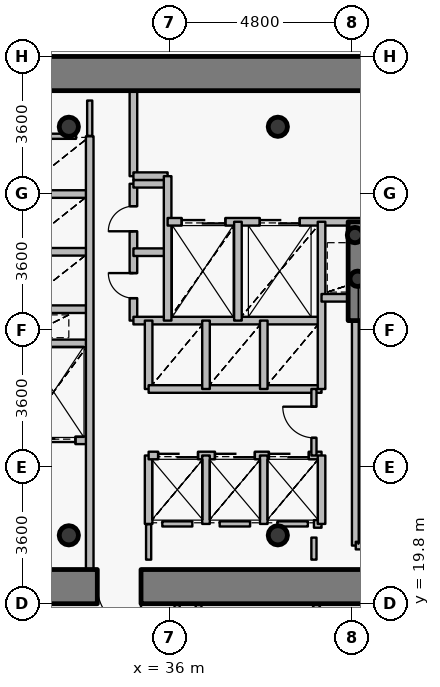
"""IFC4 building model, lengths in metres.
Left out: names, types, materials, properties, quantities, classifications, styles, units other than length and angle.
Written with IfcOpenShell. Run it as: python <this file> out.ifc"""

import sys

from ifc_helpers import new_model, si_unit, direction, frame, frame_2d, origin, origin_2d, place, context, subcontext, project, spatial, rectangle, hollow_circle, extrude, source, transform, mapped, element, fill, save


model = new_model("IFC4")
c1 = context("Model", 3, precision=1e-05, world=origin(), true_north=direction((0.0, 1.0)))
c2 = subcontext(c1, "Body", "Model", "MODEL_VIEW")
j1 = project(units=[si_unit("LENGTHUNIT", "METRE"), si_unit("PLANEANGLEUNIT", "RADIAN")], contexts=[c1])
p1 = place(None, origin())
s1 = spatial("IfcSite", under=j1, at=p1, CompositionType="ELEMENT")
p2 = place(p1, origin())
s2 = spatial("IfcBuilding", under=s1, at=p2, CompositionType="ELEMENT")
p3 = place(p2, frame((0.0, 0.0, 53.4)))
s3 = spatial("IfcBuildingStorey", under=s2, at=p3, CompositionType="ELEMENT", Elevation=53.4)
for number, where, z_axis, x_axis in (
    (1, (33.35, 21.6, 0.0), (0.0, 0.0, 1.0), (1.0, 0.0, 0.0)),
    (2, (38.85, 21.6, 0.0), (0.0, 0.0, 1.0), (1.0, 0.0, 0.0)),
    (3, (38.85, 32.35, 0.0), (0.0, 0.0, 1.0), (1.0, 0.0, 0.0)),
    (4, (33.35, 32.35, 0.0), (0.0, 0.0, 1.0), (1.0, 0.0, 0.0)),
):
    element("IfcColumn", number, at=place(p3, frame(where, z_axis=z_axis, x_axis=x_axis)), inside=s3, PredefinedType="COLUMN", context=c2, shape_type="SweptSolid", body=[
        extrude(hollow_circle(Radius=0.254, WallThickness=0.02, at=origin_2d()), origin(), (0.0, 0.0, 1.0), 4.2),
    ])
for number, where, z_axis, x_axis in (
    (5, (40.95, 28.35, 0.0), (0.0, 0.0, 1.0), (1.0, 0.0, 0.0)),
    (6, (40.88, 29.5, 0.0), (0.0, 0.0, 1.0), (1.0, 0.0, 0.0)),
):
    element("IfcColumn", number, at=place(p3, frame(where, z_axis=z_axis, x_axis=x_axis)), inside=s3, PredefinedType="COLUMN", context=c2, shape_type="SweptSolid", body=[
        extrude(hollow_circle(Radius=0.203, WallThickness=0.016, at=origin_2d()), origin(), (0.0, 0.0, 1.0), 4.2),
    ])
p4 = place(p3, frame((26.75, 33.75, 0.0), z_axis=(0.0, 0.0, 1.0), x_axis=(1.0, 0.0, 0.0)))
e7 = element("IfcWall", 7, at=p4, inside=s3, PredefinedType="SHEAR", context=c2, shape_type="SweptSolid", body=[
    extrude(rectangle(XDim=18.5, YDim=0.9, at=frame_2d((9.25, 0.0))), origin(), (0.0, 0.0, 1.0), 3.4),
])
p5 = place(p3, frame((45.25, 20.25, 0.0), z_axis=(0.0, 0.0, 1.0), x_axis=(-1.0, 0.0, 0.0)))
e8 = element("IfcWall", 8, at=p5, inside=s3, PredefinedType="SHEAR", context=c2, shape_type="SweptSolid", body=[
    extrude(rectangle(XDim=18.5, YDim=0.9, at=frame_2d((9.25, 0.0))), origin(), (0.0, 0.0, 1.0), 3.4),
])
p6 = place(p5, frame((10.0, 0.0, 0.0)))
e9 = element("IfcOpeningElement", 9, at=p6, cuts=e8, PredefinedType="OPENING", context=c2, shape_type="SweptSolid", body=[
    extrude(rectangle(XDim=1.15, YDim=2.15, at=origin_2d()), frame((0.575, 0.46, 1.075), z_axis=(0.0, -1.0, 0.0), x_axis=(1.0, 0.0, 0.0)), (0.0, 0.0, 1.0), 0.92),
])
p7 = place(p3, frame((40.9, 27.25, 0.0), z_axis=(0.0, 0.0, 1.0), x_axis=(0.0, 1.0, 0.0)))
e10 = element("IfcWall", 10, at=p7, inside=s3, PredefinedType="SHEAR", context=c2, shape_type="SweptSolid", body=[
    extrude(rectangle(XDim=2.6, YDim=0.4, at=frame_2d((1.3, 0.0))), origin(), (0.0, 0.0, 1.0), 3.55),
])
p8 = place(p3, frame((32.0, 24.1, 0.0), z_axis=(0.0, 0.0, 1.0), x_axis=(1.0, 0.0, 0.0)))
e11 = element("IfcWall", 11, at=p8, inside=s3, PredefinedType="PARTITIONING", context=c2, shape_type="SweptSolid", body=[
    extrude(rectangle(XDim=1.9, YDim=0.2, at=frame_2d((0.95, 0.0))), origin(), (0.0, 0.0, 1.0), 3.535),
])
p9 = place(p8, frame((0.375, 0.0, 0.0)))
e12 = element("IfcOpeningElement", 12, at=p9, cuts=e11, PredefinedType="OPENING", context=c2, shape_type="SweptSolid", body=[
    extrude(rectangle(XDim=1.15, YDim=2.15, at=origin_2d()), frame((0.575, 0.11, 1.075), z_axis=(0.0, -1.0, 0.0), x_axis=(1.0, 0.0, 0.0)), (0.0, 0.0, 1.0), 0.22),
])
for number, where, z_axis, x_axis in (
    (13, (32.0, 26.65, 0.0), (0.0, 0.0, 1.0), (1.0, 0.0, 0.0)),
    (14, (32.0, 27.55, 0.0), (0.0, 0.0, 1.0), (1.0, 0.0, 0.0)),
    (15, (32.0, 29.06, 0.0), (0.0, 0.0, 1.0), (1.0, 0.0, 0.0)),
    (16, (32.0, 30.58, 0.0), (0.0, 0.0, 1.0), (1.0, 0.0, 0.0)),
):
    element("IfcWall", number, at=place(p3, frame(where, z_axis=z_axis, x_axis=x_axis)), inside=s3, PredefinedType="PARTITIONING", context=c2, shape_type="SweptSolid", body=[
        extrude(rectangle(XDim=1.9, YDim=0.2, at=frame_2d((0.95, 0.0))), origin(), (0.0, 0.0, 1.0), 3.535),
    ])
p10 = place(p3, frame((33.9, 20.7, 0.0), z_axis=(0.0, 0.0, 1.0), x_axis=(0.0, 1.0, 0.0)))
e17 = element("IfcWall", 17, at=p10, inside=s3, PredefinedType="PARTITIONING", context=c2, shape_type="SweptSolid", body=[
    extrude(rectangle(XDim=11.4, YDim=0.2, at=frame_2d((5.7, 0.0))), origin(), (0.0, 0.0, 1.0), 3.535),
])
p11 = place(p3, frame((35.05, 27.25, 0.0), z_axis=(0.0, 0.0, 1.0), x_axis=(0.0, 1.0, 0.0)))
e18 = element("IfcWall", 18, at=p11, inside=s3, PredefinedType="PARTITIONING", context=c2, shape_type="SweptSolid", body=[
    extrude(rectangle(XDim=3.6, YDim=0.2, at=frame_2d((1.8, 0.0))), origin(), (0.0, 0.0, 1.0), 3.95),
])
p12 = place(p11, frame((0.59, 0.0, 0.0)))
e19 = element("IfcOpeningElement", 19, at=p12, cuts=e18, PredefinedType="OPENING", context=c2, shape_type="SweptSolid", body=[
    extrude(rectangle(XDim=0.66, YDim=2.05, at=origin_2d()), frame((0.33, 0.11, 1.025), z_axis=(0.0, -1.0, 0.0), x_axis=(1.0, 0.0, 0.0)), (0.0, 0.0, 1.0), 0.22),
])
p13 = place(p11, frame((2.35, 0.0, 0.0)))
e20 = element("IfcOpeningElement", 20, at=p13, cuts=e18, PredefinedType="OPENING", context=c2, shape_type="SweptSolid", body=[
    extrude(rectangle(XDim=0.66, YDim=2.05, at=origin_2d()), frame((0.33, 0.11, 1.025), z_axis=(0.0, -1.0, 0.0), x_axis=(1.0, 0.0, 0.0)), (0.0, 0.0, 1.0), 0.22),
])
p14 = place(p3, frame((35.05, 27.25, 0.0), z_axis=(0.0, 0.0, 1.0), x_axis=(1.0, 0.0, 0.0)))
e21 = element("IfcWall", 21, at=p14, inside=s3, PredefinedType="PARTITIONING", context=c2, shape_type="SweptSolid", body=[
    extrude(rectangle(XDim=4.95, YDim=0.2, at=frame_2d((2.475, 0.0))), origin(), (0.0, 0.0, 1.0), 3.535),
])
for number, where, z_axis, x_axis in (
    (22, (35.05, 29.05, 0.0), (0.0, 0.0, 1.0), (1.0, 0.0, 0.0)),
    (23, (35.05, 30.85, 0.0), (0.0, 0.0, 1.0), (1.0, 0.0, 0.0)),
):
    element("IfcWall", number, at=place(p3, frame(where, z_axis=z_axis, x_axis=x_axis)), inside=s3, PredefinedType="PARTITIONING", context=c2, shape_type="SweptSolid", body=[
        extrude(rectangle(XDim=0.9, YDim=0.2, at=frame_2d((0.45, 0.0))), origin(), (0.0, 0.0, 1.0), 3.95),
    ])
p15 = place(p3, frame((35.05, 31.05, 0.0), z_axis=(0.0, 0.0, 1.0), x_axis=(0.0, 1.0, 0.0)))
e24 = element("IfcWall", 24, at=p15, inside=s3, PredefinedType="PARTITIONING", context=c2, shape_type="SweptSolid", body=[
    extrude(rectangle(XDim=2.25, YDim=0.2, at=frame_2d((1.125, 0.0))), origin(), (0.0, 0.0, 1.0), 3.535),
])
p16 = place(p3, frame((35.05, 31.05, 0.0), z_axis=(0.0, 0.0, 1.0), x_axis=(1.0, 0.0, 0.0)))
e25 = element("IfcWall", 25, at=p16, inside=s3, PredefinedType="PARTITIONING", context=c2, shape_type="SweptSolid", body=[
    extrude(rectangle(XDim=0.9, YDim=0.2, at=frame_2d((0.45, 0.0))), origin(), (0.0, 0.0, 1.0), 3.95),
])
p17 = place(p3, frame((35.45, 21.9, 0.0), z_axis=(0.0, 0.0, 1.0), x_axis=(0.0, 1.0, 0.0)))
e26 = element("IfcWall", 26, at=p17, inside=s3, PredefinedType="PARTITIONING", context=c2, shape_type="SweptSolid", body=[
    extrude(rectangle(XDim=1.8, YDim=0.2, at=frame_2d((0.9, 0.0))), origin(), (0.0, 0.0, 1.0), 3.95),
])
p18 = place(p3, frame((35.45, 23.7, 0.0), z_axis=(0.0, 0.0, 1.0), x_axis=(1.0, 0.0, 0.0)))
e27 = element("IfcWall", 27, at=p18, inside=s3, PredefinedType="PARTITIONING", context=c2, shape_type="SweptSolid", body=[
    extrude(rectangle(XDim=4.55, YDim=0.2, at=frame_2d((2.275, 0.0))), origin(), (0.0, 0.0, 1.0), 3.535),
])
p19 = place(p18, frame((0.25, 0.0, 0.0)))
e28 = element("IfcOpeningElement", 28, at=p19, cuts=e27, PredefinedType="OPENING", context=c2, shape_type="SweptSolid", body=[
    extrude(rectangle(XDim=1.05, YDim=2.15, at=origin_2d()), frame((0.525, 0.11, 1.075), z_axis=(0.0, -1.0, 0.0), x_axis=(1.0, 0.0, 0.0)), (0.0, 0.0, 1.0), 0.22),
])
p20 = place(p18, frame((1.745, 0.0, 0.0)))
e29 = element("IfcOpeningElement", 29, at=p20, cuts=e27, PredefinedType="OPENING", context=c2, shape_type="SweptSolid", body=[
    extrude(rectangle(XDim=1.05, YDim=2.15, at=origin_2d()), frame((0.525, 0.11, 1.075), z_axis=(0.0, -1.0, 0.0), x_axis=(1.0, 0.0, 0.0)), (0.0, 0.0, 1.0), 0.22),
])
p21 = place(p18, frame((3.165, 0.0, 0.0)))
e30 = element("IfcOpeningElement", 30, at=p21, cuts=e27, PredefinedType="OPENING", context=c2, shape_type="SweptSolid", body=[
    extrude(rectangle(XDim=1.05, YDim=2.15, at=origin_2d()), frame((0.525, 0.11, 1.075), z_axis=(0.0, -1.0, 0.0), x_axis=(1.0, 0.0, 0.0)), (0.0, 0.0, 1.0), 0.22),
])
p22 = place(p3, frame((35.45, 25.45, 0.0), z_axis=(0.0, 0.0, 1.0), x_axis=(0.0, 1.0, 0.0)))
e31 = element("IfcWall", 31, at=p22, inside=s3, PredefinedType="PARTITIONING", context=c2, shape_type="SweptSolid", body=[
    extrude(rectangle(XDim=1.8, YDim=0.2, at=frame_2d((0.9, 0.0))), origin(), (0.0, 0.0, 1.0), 3.95),
])
p23 = place(p3, frame((35.45, 25.45, 0.0), z_axis=(0.0, 0.0, 1.0), x_axis=(1.0, 0.0, 0.0)))
e32 = element("IfcWall", 32, at=p23, inside=s3, PredefinedType="PARTITIONING", context=c2, shape_type="SweptSolid", body=[
    extrude(rectangle(XDim=4.55, YDim=0.2, at=frame_2d((2.275, 0.0))), origin(), (0.0, 0.0, 1.0), 3.535),
])
p24 = place(p3, frame((35.95, 27.25, 0.0), z_axis=(0.0, 0.0, 1.0), x_axis=(0.0, 1.0, 0.0)))
e33 = element("IfcWall", 33, at=p24, inside=s3, PredefinedType="PARTITIONING", context=c2, shape_type="SweptSolid", body=[
    extrude(rectangle(XDim=3.8, YDim=0.2, at=frame_2d((1.9, 0.0))), origin(), (0.0, 0.0, 1.0), 3.95),
])
p25 = place(p3, frame((35.95, 29.85, 0.0), z_axis=(0.0, 0.0, 1.0), x_axis=(1.0, 0.0, 0.0)))
e34 = element("IfcWall", 34, at=p25, inside=s3, PredefinedType="PARTITIONING", context=c2, shape_type="SweptSolid", body=[
    extrude(rectangle(XDim=8.49, YDim=0.2, at=frame_2d((4.245, 0.0))), origin(), (0.0, 0.0, 1.0), 3.535),
])
p26 = place(p25, frame((6.1, 0.0, 0.0)))
e35 = element("IfcOpeningElement", 35, at=p26, cuts=e34, PredefinedType="OPENING", context=c2, shape_type="SweptSolid", body=[
    extrude(rectangle(XDim=1.2, YDim=2.15, at=origin_2d()), frame((0.6, 0.11, 1.075), z_axis=(0.0, -1.0, 0.0), x_axis=(1.0, 0.0, 0.0)), (0.0, 0.0, 1.0), 0.22),
])
p27 = place(p25, frame((0.37, 0.0, 0.0)))
e36 = element("IfcOpeningElement", 36, at=p27, cuts=e34, PredefinedType="OPENING", context=c2, shape_type="SweptSolid", body=[
    extrude(rectangle(XDim=1.15, YDim=2.15, at=origin_2d()), frame((0.575, 0.11, 1.075), z_axis=(0.0, -1.0, 0.0), x_axis=(1.0, 0.0, 0.0)), (0.0, 0.0, 1.0), 0.22),
])
p28 = place(p25, frame((2.425, 0.0, 0.0)))
e37 = element("IfcOpeningElement", 37, at=p28, cuts=e34, PredefinedType="OPENING", context=c2, shape_type="SweptSolid", body=[
    extrude(rectangle(XDim=1.05, YDim=2.15, at=origin_2d()), frame((0.525, 0.11, 1.075), z_axis=(0.0, -1.0, 0.0), x_axis=(1.0, 0.0, 0.0)), (0.0, 0.0, 1.0), 0.22),
])
p29 = place(p3, frame((36.2, 17.9, 0.0), z_axis=(0.0, 0.0, 1.0), x_axis=(0.0, 1.0, 0.0)))
e38 = element("IfcWall", 38, at=p29, inside=s3, PredefinedType="PARTITIONING", context=c2, shape_type="SweptSolid", body=[
    extrude(rectangle(XDim=1.9, YDim=0.135, at=frame_2d((0.95, 0.0))), origin(), (0.0, 0.0, 1.0), 3.285),
])
p30 = place(p3, frame((36.757, 19.8, 0.0), z_axis=(0.0, 0.0, 1.0), x_axis=(0.10451927992, -0.994522860534, 0.0)))
e39 = element("IfcWall", 39, at=p30, inside=s3, PredefinedType="PARTITIONING", context=c2, shape_type="SweptSolid", body=[
    extrude(rectangle(XDim=17.047, YDim=0.15, at=frame_2d((8.523, 0.0))), origin(), (0.0, 0.0, 1.0), 3.335),
])
p31 = place(p30, frame((7.999, 0.0, 0.0)))
e40 = element("IfcOpeningElement", 40, at=p31, cuts=e39, PredefinedType="OPENING", context=c2, shape_type="SweptSolid", body=[
    extrude(rectangle(XDim=1.05, YDim=2.15, at=origin_2d()), frame((0.525, 0.085, 1.075), z_axis=(0.0, -1.0, 0.0), x_axis=(1.0, 0.0, 0.0)), (0.0, 0.0, 1.0), 0.17),
])
for number, where, z_axis, x_axis in (
    (41, (36.96, 21.9, 0.0), (0.0, 0.0, 1.0), (0.0, 1.0, 0.0)),
    (42, (36.96, 25.45, 0.0), (0.0, 0.0, 1.0), (0.0, 1.0, 0.0)),
):
    element("IfcWall", number, at=place(p3, frame(where, z_axis=z_axis, x_axis=x_axis)), inside=s3, PredefinedType="PARTITIONING", context=c2, shape_type="SweptSolid", body=[
        extrude(rectangle(XDim=1.8, YDim=0.2, at=frame_2d((0.9, 0.0))), origin(), (0.0, 0.0, 1.0), 3.95),
    ])
p32 = place(p3, frame((37.8, 27.25, 0.0), z_axis=(0.0, 0.0, 1.0), x_axis=(0.0, 1.0, 0.0)))
e43 = element("IfcWall", 43, at=p32, inside=s3, PredefinedType="PARTITIONING", context=c2, shape_type="SweptSolid", body=[
    extrude(rectangle(XDim=2.6, YDim=0.2, at=frame_2d((1.3, 0.0))), origin(), (0.0, 0.0, 1.0), 3.95),
])
for number, where, z_axis, x_axis in (
    (44, (38.48, 21.9, 0.0), (0.0, 0.0, 1.0), (0.0, 1.0, 0.0)),
    (45, (38.48, 25.45, 0.0), (0.0, 0.0, 1.0), (0.0, 1.0, 0.0)),
):
    element("IfcWall", number, at=place(p3, frame(where, z_axis=z_axis, x_axis=x_axis)), inside=s3, PredefinedType="PARTITIONING", context=c2, shape_type="SweptSolid", body=[
        extrude(rectangle(XDim=1.8, YDim=0.2, at=frame_2d((0.9, 0.0))), origin(), (0.0, 0.0, 1.0), 3.95),
    ])
p33 = place(p3, frame((39.8, 21.9, 0.0), z_axis=(0.0, 0.0, 1.0), x_axis=(1.0, 0.0, 0.0)))
e46 = element("IfcWall", 46, at=p33, inside=s3, PredefinedType="PARTITIONING", context=c2, shape_type="SweptSolid", body=[
    extrude(rectangle(XDim=0.2, YDim=0.2, at=frame_2d((0.1, 0.0))), origin(), (0.0, 0.0, 1.0), 3.95),
])
p34 = place(p3, frame((39.8, 23.7, 0.0), z_axis=(0.0, 0.0, 1.0), x_axis=(0.0, 1.0, 0.0)))
e47 = element("IfcWall", 47, at=p34, inside=s3, PredefinedType="PARTITIONING", context=c2, shape_type="SweptSolid", body=[
    extrude(rectangle(XDim=1.75, YDim=0.135, at=frame_2d((0.875, 0.0))), origin(), (0.0, 0.0, 1.0), 3.95),
])
p35 = place(p34, frame((0.465, 0.0, 0.0)))
e48 = element("IfcOpeningElement", 48, at=p35, cuts=e47, PredefinedType="OPENING", context=c2, shape_type="SweptSolid", body=[
    extrude(rectangle(XDim=0.82, YDim=2.1, at=origin_2d()), frame((0.41, 0.078, 1.05), z_axis=(0.0, -1.0, 0.0), x_axis=(1.0, 0.0, 0.0)), (0.0, 0.0, 1.0), 0.155),
])
p36 = place(p3, frame((39.828, 19.8, 0.0), z_axis=(0.0, 0.0, 1.0), x_axis=(0.469475400737, -0.882945552174, 0.0)))
e49 = element("IfcWall", 49, at=p36, inside=s3, PredefinedType="PARTITIONING", context=c2, shape_type="SweptSolid", body=[
    extrude(rectangle(XDim=17.188, YDim=0.15, at=frame_2d((8.594, 0.0))), origin(), (0.0, 0.0, 1.0), 3.335),
])
p37 = place(p36, frame((8.069, 0.0, 0.0)))
e50 = element("IfcOpeningElement", 50, at=p37, cuts=e49, PredefinedType="OPENING", context=c2, shape_type="SweptSolid", body=[
    extrude(rectangle(XDim=1.05, YDim=2.15, at=origin_2d()), frame((0.525, 0.085, 1.075), z_axis=(0.0, -1.0, 0.0), x_axis=(1.0, 0.0, 0.0)), (0.0, 0.0, 1.0), 0.17),
])
p38 = place(p3, frame((40.0, 21.9, 0.0), z_axis=(0.0, 0.0, 1.0), x_axis=(0.0, 1.0, 0.0)))
e51 = element("IfcWall", 51, at=p38, inside=s3, PredefinedType="PARTITIONING", context=c2, shape_type="SweptSolid", body=[
    extrude(rectangle(XDim=1.8, YDim=0.2, at=frame_2d((0.9, 0.0))), origin(), (0.0, 0.0, 1.0), 3.95),
])
p39 = place(p3, frame((40.0, 25.45, 0.0), z_axis=(0.0, 0.0, 1.0), x_axis=(0.0, 1.0, 0.0)))
e52 = element("IfcWall", 52, at=p39, inside=s3, PredefinedType="PARTITIONING", context=c2, shape_type="SweptSolid", body=[
    extrude(rectangle(XDim=4.4, YDim=0.2, at=frame_2d((2.2, 0.0))), origin(), (0.0, 0.0, 1.0), 3.95),
])
p40 = place(p3, frame((40.0, 27.85, 0.0), z_axis=(0.0, 0.0, 1.0), x_axis=(1.0, 0.0, 0.0)))
e53 = element("IfcWall", 53, at=p40, inside=s3, PredefinedType="PARTITIONING", context=c2, shape_type="SweptSolid", body=[
    extrude(rectangle(XDim=0.9, YDim=0.2, at=frame_2d((0.45, 0.0))), origin(), (0.0, 0.0, 1.0), 3.95),
])
p41 = place(p3, frame((40.9, 21.33, 0.0), z_axis=(0.0, 0.0, 1.0), x_axis=(0.0, 1.0, 0.0)))
e54 = element("IfcWall", 54, at=p41, inside=s3, PredefinedType="PARTITIONING", context=c2, shape_type="SweptSolid", body=[
    extrude(rectangle(XDim=5.91, YDim=0.2, at=frame_2d((2.955, 0.0))), origin(), (0.0, 0.0, 1.0), 3.485),
])
p42 = place(p3, frame((40.9, 21.33, 0.0), z_axis=(0.0, 0.0, 1.0), x_axis=(1.0, 0.0, 0.0)))
e55 = element("IfcWall", 55, at=p42, inside=s3, PredefinedType="PARTITIONING", context=c2, shape_type="SweptSolid", body=[
    extrude(rectangle(XDim=0.25, YDim=0.2, at=frame_2d((0.125, 0.0))), origin(), (0.0, 0.0, 1.0), 3.485),
])
p43 = place(p3, frame((36.6, 21.9, 0.0), z_axis=(0.0, 0.0, 1.0), x_axis=(-1.0, 0.0, 0.0)))
e56 = element("IfcWall", 56, at=p43, inside=s3, PredefinedType="PARTITIONING", context=c2, shape_type="SweptSolid", body=[
    extrude(rectangle(XDim=0.79, YDim=0.135, at=frame_2d((0.395, 0.0))), origin(), (0.0, 0.0, 1.0), 3.95),
])
p44 = place(p3, frame((38.12, 21.9, 0.0), z_axis=(0.0, 0.0, 1.0), x_axis=(-1.0, 0.0, 0.0)))
e57 = element("IfcWall", 57, at=p44, inside=s3, PredefinedType="PARTITIONING", context=c2, shape_type="SweptSolid", body=[
    extrude(rectangle(XDim=0.8, YDim=0.135, at=frame_2d((0.4, 0.0))), origin(), (0.0, 0.0, 1.0), 3.95),
])
p45 = place(p3, frame((39.64, 21.9, 0.0), z_axis=(0.0, 0.0, 1.0), x_axis=(-1.0, 0.0, 0.0)))
e58 = element("IfcWall", 58, at=p45, inside=s3, PredefinedType="PARTITIONING", context=c2, shape_type="SweptSolid", body=[
    extrude(rectangle(XDim=0.8, YDim=0.135, at=frame_2d((0.4, 0.0))), origin(), (0.0, 0.0, 1.0), 3.535),
])
p46 = place(p3, frame((32.36, 32.1, 0.0), z_axis=(0.0, 0.0, 1.0), x_axis=(1.0, 0.0, 0.0)))
e59 = element("IfcWall", 59, at=p46, inside=s3, PredefinedType="PARTITIONING", context=c2, shape_type="SweptSolid", body=[
    extrude(rectangle(XDim=1.18, YDim=0.135, at=frame_2d((0.59, 0.0))), origin(), (0.0, 0.0, 1.0), 3.535),
])
p47 = place(p3, frame((39.8, 20.96, 0.0), z_axis=(0.0, 0.0, 1.0), x_axis=(0.0, 1.0, 0.0)))
e60 = element("IfcWall", 60, at=p47, inside=s3, PredefinedType="PARTITIONING", context=c2, shape_type="SweptSolid", body=[
    extrude(rectangle(XDim=0.58, YDim=0.135, at=frame_2d((0.29, 0.0))), origin(), (0.0, 0.0, 1.0), 3.485),
])
for number, where, z_axis, x_axis in (
    (61, (35.45, 21.89, 0.0), (0.0, 0.0, 1.0), (0.0, -1.0, 0.0)),
    (62, (33.9, 32.11, 0.0), (0.0, 0.0, 1.0), (0.0, 1.0, 0.0)),
):
    element("IfcWall", number, at=place(p3, frame(where, z_axis=z_axis, x_axis=x_axis)), inside=s3, PredefinedType="PARTITIONING", context=c2, shape_type="SweptSolid", body=[
        extrude(rectangle(XDim=0.93, YDim=0.135, at=frame_2d((0.465, 0.0))), origin(), (0.0, 0.0, 1.0), 3.535),
    ])
m1 = source(origin(), c2, "Body", "SweptSolid", [
    extrude(rectangle(XDim=1.15, YDim=2.15, at=origin_2d()), frame((0.575, 0.025, 1.075), z_axis=(0.0, -1.0, 0.0), x_axis=(1.0, 0.0, 0.0)), (0.0, 0.0, 1.0), 0.05),
])
p48 = place(p6, origin())
e63 = element("IfcDoor", 63, at=p48, inside=s3, OperationType="SINGLE_SWING_LEFT", PredefinedType="DOOR", context=c2, shape_type="MappedRepresentation", body=[
    mapped(m1, transform((0.0, 0.0, 0.0), x_axis=(1.0, 0.0, 0.0), y_axis=(0.0, 1.0, 0.0), z_axis=(0.0, 0.0, 1.0), scale=1.0)),
])
fill(e9, e63)
m2 = source(origin(), c2, "Body", "SweptSolid", [
    extrude(rectangle(XDim=1.15, YDim=2.15, at=origin_2d()), frame((0.575, 0.025, 1.075), z_axis=(0.0, -1.0, 0.0), x_axis=(1.0, 0.0, 0.0)), (0.0, 0.0, 1.0), 0.05),
])
p49 = place(p27, origin())
e64 = element("IfcDoor", 64, at=p49, inside=s3, OperationType="DOUBLE_DOOR_SLIDING", PredefinedType="USERDEFINED", context=c2, shape_type="MappedRepresentation", body=[
    mapped(m2, transform((0.0, 0.0, 0.0), x_axis=(1.0, 0.0, 0.0), y_axis=(0.0, 1.0, 0.0), z_axis=(0.0, 0.0, 1.0), scale=1.0)),
])
fill(e36, e64)
p50 = place(p9, origin())
e65 = element("IfcDoor", 65, at=p50, inside=s3, OperationType="DOUBLE_DOOR_SLIDING", PredefinedType="USERDEFINED", context=c2, shape_type="MappedRepresentation", body=[
    mapped(m2, transform((0.0, 0.0, 0.0), x_axis=(1.0, 0.0, 0.0), y_axis=(0.0, 1.0, 0.0), z_axis=(0.0, 0.0, 1.0), scale=1.0)),
])
fill(e12, e65)
m3 = source(origin(), c2, "Body", "SweptSolid", [
    extrude(rectangle(XDim=1.05, YDim=2.15, at=origin_2d()), frame((0.525, 0.025, 1.075), z_axis=(0.0, -1.0, 0.0), x_axis=(1.0, 0.0, 0.0)), (0.0, 0.0, 1.0), 0.05),
])
p51 = place(p28, origin())
e66 = element("IfcDoor", 66, at=p51, inside=s3, OperationType="DOUBLE_DOOR_SLIDING", PredefinedType="USERDEFINED", context=c2, shape_type="MappedRepresentation", body=[
    mapped(m3, transform((0.0, 0.0, 0.0), x_axis=(1.0, 0.0, 0.0), y_axis=(0.0, 1.0, 0.0), z_axis=(0.0, 0.0, 1.0), scale=1.0)),
])
fill(e37, e66)
p52 = place(p19, origin())
e67 = element("IfcDoor", 67, at=p52, inside=s3, OperationType="DOUBLE_DOOR_SLIDING", PredefinedType="USERDEFINED", context=c2, shape_type="MappedRepresentation", body=[
    mapped(m3, transform((0.0, 0.0, 0.0), x_axis=(1.0, 0.0, 0.0), y_axis=(0.0, 1.0, 0.0), z_axis=(0.0, 0.0, 1.0), scale=1.0)),
])
fill(e28, e67)
p53 = place(p20, origin())
e68 = element("IfcDoor", 68, at=p53, inside=s3, OperationType="DOUBLE_DOOR_SLIDING", PredefinedType="USERDEFINED", context=c2, shape_type="MappedRepresentation", body=[
    mapped(m3, transform((0.0, 0.0, 0.0), x_axis=(1.0, 0.0, 0.0), y_axis=(0.0, 1.0, 0.0), z_axis=(0.0, 0.0, 1.0), scale=1.0)),
])
fill(e29, e68)
p54 = place(p21, origin())
e69 = element("IfcDoor", 69, at=p54, inside=s3, OperationType="DOUBLE_DOOR_SLIDING", PredefinedType="USERDEFINED", context=c2, shape_type="MappedRepresentation", body=[
    mapped(m3, transform((0.0, 0.0, 0.0), x_axis=(1.0, 0.0, 0.0), y_axis=(0.0, 1.0, 0.0), z_axis=(0.0, 0.0, 1.0), scale=1.0)),
])
fill(e30, e69)
m4 = source(origin(), c2, "Body", "SweptSolid", [
    extrude(rectangle(XDim=0.66, YDim=2.05, at=origin_2d()), frame((0.33, 0.025, 1.025), z_axis=(0.0, -1.0, 0.0), x_axis=(1.0, 0.0, 0.0)), (0.0, 0.0, 1.0), 0.05),
])
p55 = place(p12, origin())
e70 = element("IfcDoor", 70, at=p55, inside=s3, OperationType="SINGLE_SWING_RIGHT", PredefinedType="USERDEFINED", context=c2, shape_type="MappedRepresentation", body=[
    mapped(m4, transform((0.0, 0.0, 0.0), x_axis=(1.0, 0.0, 0.0), y_axis=(0.0, 1.0, 0.0), z_axis=(0.0, 0.0, 1.0), scale=1.0)),
])
fill(e19, e70)
p56 = place(p13, origin())
e71 = element("IfcDoor", 71, at=p56, inside=s3, OperationType="SINGLE_SWING_LEFT", PredefinedType="USERDEFINED", context=c2, shape_type="MappedRepresentation", body=[
    mapped(m4, transform((0.0, 0.0, 0.0), x_axis=(1.0, 0.0, 0.0), y_axis=(0.0, 1.0, 0.0), z_axis=(0.0, 0.0, 1.0), scale=1.0)),
])
fill(e20, e71)
m5 = source(origin(), c2, "Body", "SweptSolid", [
    extrude(rectangle(XDim=0.82, YDim=2.1, at=origin_2d()), frame((0.41, 0.025, 1.05), z_axis=(0.0, -1.0, 0.0), x_axis=(1.0, 0.0, 0.0)), (0.0, 0.0, 1.0), 0.05),
])
p57 = place(p35, origin())
e72 = element("IfcDoor", 72, at=p57, inside=s3, OperationType="SINGLE_SWING_RIGHT", PredefinedType="DOOR", context=c2, shape_type="MappedRepresentation", body=[
    mapped(m5, transform((0.0, 0.0, 0.0), x_axis=(1.0, 0.0, 0.0), y_axis=(0.0, 1.0, 0.0), z_axis=(0.0, 0.0, 1.0), scale=1.0)),
])
fill(e48, e72)
save(model, sys.argv[1])
